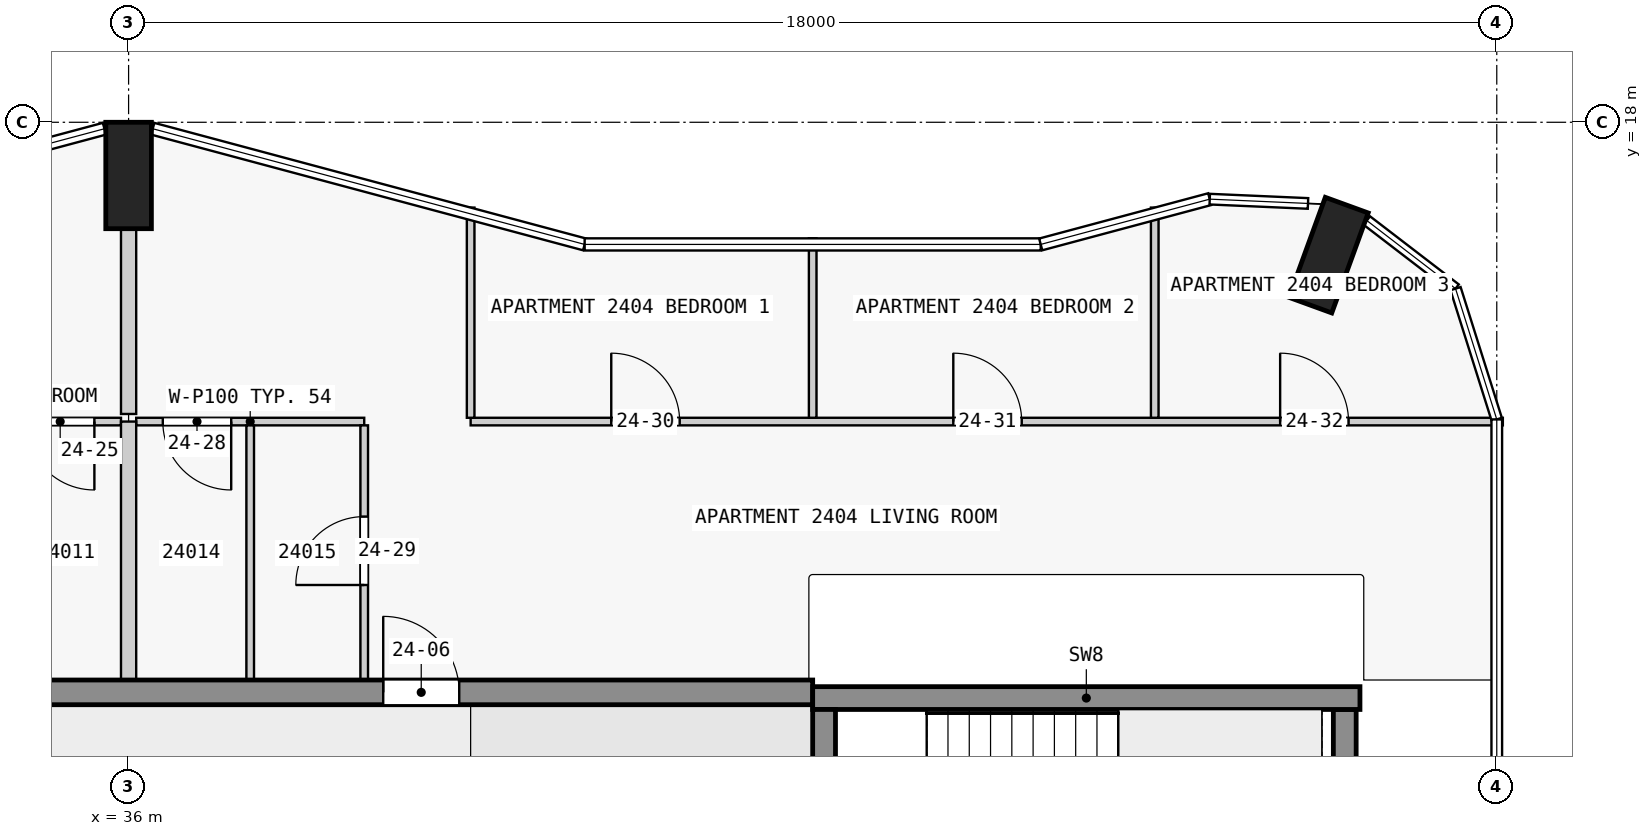
"""IFC4 building model, lengths in metres.
Left out: names, types, materials, properties, quantities, classifications, styles, units other than length and angle.
Written with IfcOpenShell. Run it as: python <this file> out.ifc"""

import sys

from ifc_helpers import new_model, si_unit, direction, frame, frame_2d, origin, origin_2d, place, context, subcontext, project, spatial, rectangle, extrude, element, fill, save


model = new_model("IFC4")
c1 = context("Model", 3, precision=1e-05, world=origin(), true_north=direction((0.0, 1.0)))
c2 = subcontext(c1, "Body", "Model", "MODEL_VIEW")
j1 = project(units=[si_unit("LENGTHUNIT", "METRE"), si_unit("PLANEANGLEUNIT", "RADIAN")], contexts=[c1])
p1 = place(None, origin())
s1 = spatial("IfcSite", under=j1, at=p1, CompositionType="ELEMENT")
p2 = place(p1, origin())
s2 = spatial("IfcBuilding", under=s1, at=p2, CompositionType="ELEMENT")
p3 = place(p2, frame((0.0, 0.0, 95.8)))
s3 = spatial("IfcBuildingStorey", under=s2, at=p3, CompositionType="ELEMENT", Elevation=95.8)
for number, where, z_axis, x_axis in (
    (1, (51.787, 16.252, 0.0), (0.0, 0.0, 1.0), (-0.94, 0.342, 0.0)),
    (2, (36.0, 17.3, 0.0), (0.0, 0.0, 1.0), (1.0, 0.0, 0.0)),
):
    element("IfcColumn", number, at=place(p3, frame(where, z_axis=z_axis, x_axis=x_axis)), inside=s3, PredefinedType="COLUMN", context=c2, shape_type="SweptSolid", body=[
        extrude(rectangle(XDim=0.6, YDim=1.4, at=origin_2d()), origin(), (0.0, 0.0, 1.0), 3.5),
    ])
p4 = place(p3, frame((45.15, 7.725, 0.0), z_axis=(0.0, 0.0, 1.0), x_axis=(0.0, 1.0, 0.0)))
e3 = element("IfcWall", 3, at=p4, inside=s3, PredefinedType="SHEAR", context=c2, shape_type="SweptSolid", body=[
    extrude(rectangle(XDim=2.55, YDim=0.3, at=frame_2d((1.275, 0.0))), origin(), (0.0, 0.0, 1.0), 3.5),
])
p5 = place(p4, frame((0.725, 0.0, 0.0)))
e4 = element("IfcOpeningElement", 4, at=p5, cuts=e3, PredefinedType="OPENING", context=c2, shape_type="SweptSolid", body=[
    extrude(rectangle(XDim=1.1, YDim=2.1, at=frame_2d((0.55, 1.05))), frame((0.0, 0.16, 0.0), z_axis=(0.0, -1.0, 0.0), x_axis=(1.0, 0.0, 0.0)), (0.0, 0.0, 1.0), 0.32),
])
p6 = place(p3, frame((52.0, 7.725, 0.0), z_axis=(0.0, 0.0, 1.0), x_axis=(0.0, 1.0, 0.0)))
e5 = element("IfcWall", 5, at=p6, inside=s3, PredefinedType="SHEAR", context=c2, shape_type="SweptSolid", body=[
    extrude(rectangle(XDim=2.55, YDim=0.3, at=frame_2d((1.275, 0.0))), origin(), (0.0, 0.0, 1.0), 3.5),
])
p7 = place(p3, frame((45.0, 10.425, 0.0), z_axis=(0.0, 0.0, 1.0), x_axis=(1.0, 0.0, 0.0)))
e6 = element("IfcWall", 6, at=p7, inside=s3, PredefinedType="SHEAR", context=c2, shape_type="SweptSolid", body=[
    extrude(rectangle(XDim=7.2, YDim=0.3, at=frame_2d((3.6, 0.0))), origin(), (0.0, 0.0, 1.0), 3.5),
])
p8 = place(p3, frame((22.5, 10.5, 0.0), z_axis=(0.0, 0.0, 1.0), x_axis=(1.0, 0.0, 0.0)))
e7 = element("IfcWall", 7, at=p8, inside=s3, PredefinedType="SHEAR", context=c2, shape_type="SweptSolid", body=[
    extrude(rectangle(XDim=22.5, YDim=0.325, at=frame_2d((11.25, 0.0))), origin(), (0.0, 0.0, 1.0), 3.25),
])
p9 = place(p8, frame((4.75, 0.0, 0.0)))
e8 = element("IfcOpeningElement", 8, at=p9, cuts=e7, PredefinedType="OPENING", context=c2, shape_type="SweptSolid", body=[
    extrude(rectangle(XDim=1.0, YDim=2.1, at=frame_2d((0.5, 1.05))), frame((0.0, 0.172, 0.0), z_axis=(0.0, -1.0, 0.0), x_axis=(1.0, 0.0, 0.0)), (0.0, 0.0, 1.0), 0.345),
])
p10 = place(p8, frame((16.85, 0.0, 0.0)))
e9 = element("IfcOpeningElement", 9, at=p10, cuts=e7, PredefinedType="OPENING", context=c2, shape_type="SweptSolid", body=[
    extrude(rectangle(XDim=1.0, YDim=2.1, at=frame_2d((0.5, 1.05))), frame((0.0, 0.172, 0.0), z_axis=(0.0, -1.0, 0.0), x_axis=(1.0, 0.0, 0.0)), (0.0, 0.0, 1.0), 0.345),
])
p11 = place(p3, frame((35.9, 14.062, 0.0), z_axis=(0.0, 0.0, 1.0), x_axis=(-1.0, 0.0, 0.0)))
e10 = element("IfcWall", 10, at=p11, inside=s3, PredefinedType="PARTITIONING", context=c2, shape_type="SweptSolid", body=[
    extrude(rectangle(XDim=3.0, YDim=0.1, at=frame_2d((1.5, 0.0))), origin(), (0.0, 0.0, 1.0), 3.25),
])
p12 = place(p11, frame((0.35, 0.0, 0.0)))
e11 = element("IfcOpeningElement", 11, at=p12, cuts=e10, PredefinedType="OPENING", context=c2, shape_type="SweptSolid", body=[
    extrude(rectangle(XDim=0.9, YDim=2.1, at=frame_2d((0.45, 1.05))), frame((0.0, 0.06, 0.0), z_axis=(0.0, -1.0, 0.0), x_axis=(1.0, 0.0, 0.0)), (0.0, 0.0, 1.0), 0.12),
])
p13 = place(p3, frame((39.1, 14.062, 0.0), z_axis=(0.0, 0.0, 1.0), x_axis=(-1.0, 0.0, 0.0)))
e12 = element("IfcWall", 12, at=p13, inside=s3, PredefinedType="PARTITIONING", context=c2, shape_type="SweptSolid", body=[
    extrude(rectangle(XDim=3.0, YDim=0.1, at=frame_2d((1.5, 0.0))), origin(), (0.0, 0.0, 1.0), 3.25),
])
p14 = place(p13, frame((1.75, 0.0, 0.0)))
e13 = element("IfcOpeningElement", 13, at=p14, cuts=e12, PredefinedType="OPENING", context=c2, shape_type="SweptSolid", body=[
    extrude(rectangle(XDim=0.9, YDim=2.1, at=frame_2d((0.45, 1.05))), frame((0.0, 0.06, 0.0), z_axis=(0.0, -1.0, 0.0), x_axis=(1.0, 0.0, 0.0)), (0.0, 0.0, 1.0), 0.12),
])
p15 = place(p3, frame((40.5, 14.062, 0.0), z_axis=(0.0, 0.0, 1.0), x_axis=(1.0, 0.0, 0.0)))
e14 = element("IfcWall", 14, at=p15, inside=s3, PredefinedType="PARTITIONING", context=c2, shape_type="SweptSolid", body=[
    extrude(rectangle(XDim=13.58, YDim=0.1, at=frame_2d((6.79, 0.0))), origin(), (0.0, 0.0, 1.0), 3.25),
])
p16 = place(p15, frame((1.85, 0.0, 0.0)))
e15 = element("IfcOpeningElement", 15, at=p16, cuts=e14, PredefinedType="OPENING", context=c2, shape_type="SweptSolid", body=[
    extrude(rectangle(XDim=0.9, YDim=2.1, at=frame_2d((0.45, 1.05))), frame((0.0, 0.06, 0.0), z_axis=(0.0, -1.0, 0.0), x_axis=(1.0, 0.0, 0.0)), (0.0, 0.0, 1.0), 0.12),
])
p17 = place(p15, frame((6.35, 0.0, 0.0)))
e16 = element("IfcOpeningElement", 16, at=p17, cuts=e14, PredefinedType="OPENING", context=c2, shape_type="SweptSolid", body=[
    extrude(rectangle(XDim=0.9, YDim=2.1, at=frame_2d((0.45, 1.05))), frame((0.0, 0.06, 0.0), z_axis=(0.0, -1.0, 0.0), x_axis=(1.0, 0.0, 0.0)), (0.0, 0.0, 1.0), 0.12),
])
p18 = place(p15, frame((10.65, 0.0, 0.0)))
e17 = element("IfcOpeningElement", 17, at=p18, cuts=e14, PredefinedType="OPENING", context=c2, shape_type="SweptSolid", body=[
    extrude(rectangle(XDim=0.9, YDim=2.1, at=frame_2d((0.45, 1.05))), frame((0.0, 0.06, 0.0), z_axis=(0.0, -1.0, 0.0), x_axis=(1.0, 0.0, 0.0)), (0.0, 0.0, 1.0), 0.12),
])
p19 = place(p3, frame((36.0, 16.6, 0.0), z_axis=(0.0, 0.0, 1.0), x_axis=(0.0, -1.0, 0.0)))
e18 = element("IfcWall", 18, at=p19, inside=s3, PredefinedType="PARTITIONING", context=c2, shape_type="SweptSolid", body=[
    extrude(rectangle(XDim=2.438, YDim=0.2, at=frame_2d((1.219, 0.0))), origin(), (0.0, 0.0, 1.0), 3.25),
])
p20 = place(p3, frame((36.0, 10.663, 0.0), z_axis=(0.0, 0.0, 1.0), x_axis=(0.0, 1.0, 0.0)))
e19 = element("IfcWall", 19, at=p20, inside=s3, PredefinedType="PARTITIONING", context=c2, shape_type="SweptSolid", body=[
    extrude(rectangle(XDim=3.4, YDim=0.2, at=frame_2d((1.7, 0.0))), origin(), (0.0, 0.0, 1.0), 3.25),
])
p21 = place(p3, frame((37.6, 10.663, 0.0), z_axis=(0.0, 0.0, 1.0), x_axis=(0.0, 1.0, 0.0)))
e20 = element("IfcWall", 20, at=p21, inside=s3, PredefinedType="PARTITIONING", context=c2, shape_type="SweptSolid", body=[
    extrude(rectangle(XDim=3.35, YDim=0.1, at=frame_2d((1.675, 0.0))), origin(), (0.0, 0.0, 1.0), 3.25),
])
p22 = place(p3, frame((39.1, 10.663, 0.0), z_axis=(0.0, 0.0, 1.0), x_axis=(0.0, 1.0, 0.0)))
e21 = element("IfcWall", 21, at=p22, inside=s3, PredefinedType="PARTITIONING", context=c2, shape_type="SweptSolid", body=[
    extrude(rectangle(XDim=3.35, YDim=0.1, at=frame_2d((1.675, 0.0))), origin(), (0.0, 0.0, 1.0), 3.25),
])
p23 = place(p22, frame((1.25, 0.0, 0.0)))
e22 = element("IfcOpeningElement", 22, at=p23, cuts=e21, PredefinedType="OPENING", context=c2, shape_type="SweptSolid", body=[
    extrude(rectangle(XDim=0.9, YDim=2.1, at=frame_2d((0.45, 1.05))), frame((0.0, 0.06, 0.0), z_axis=(0.0, -1.0, 0.0), x_axis=(1.0, 0.0, 0.0)), (0.0, 0.0, 1.0), 0.12),
])
p24 = place(p3, frame((40.5, 16.878, 0.0), z_axis=(0.0, 0.0, 1.0), x_axis=(0.0, -1.0, 0.0)))
e23 = element("IfcWall", 23, at=p24, inside=s3, PredefinedType="PARTITIONING", context=c2, shape_type="SweptSolid", body=[
    extrude(rectangle(XDim=2.765, YDim=0.1, at=frame_2d((1.383, 0.0))), origin(), (0.0, 0.0, 1.0), 3.25),
])
p25 = place(p3, frame((45.0, 14.113, 0.0), z_axis=(0.0, 0.0, 1.0), x_axis=(0.0, 1.0, 0.0)))
e24 = element("IfcWall", 24, at=p25, inside=s3, PredefinedType="PARTITIONING", context=c2, shape_type="SweptSolid", body=[
    extrude(rectangle(XDim=2.361, YDim=0.1, at=frame_2d((1.18, 0.0))), origin(), (0.0, 0.0, 1.0), 3.25),
])
p26 = place(p3, frame((49.5, 14.113, 0.0), z_axis=(0.0, 0.0, 1.0), x_axis=(0.0, 1.0, 0.0)))
e25 = element("IfcWall", 25, at=p26, inside=s3, PredefinedType="PARTITIONING", context=c2, shape_type="SweptSolid", body=[
    extrude(rectangle(XDim=2.765, YDim=0.1, at=frame_2d((1.383, 0.0))), origin(), (0.0, 0.0, 1.0), 3.25),
])
p27 = place(p10, origin())
e26 = element("IfcDoor", 26, at=p27, inside=s3, OperationType="SINGLE_SWING_RIGHT", PredefinedType="DOOR", context=c2, shape_type="SweptSolid", body=[
    extrude(rectangle(XDim=1.0, YDim=2.1, at=frame_2d((0.5, 1.05))), frame((0.0, 0.025, 0.0), z_axis=(0.0, -1.0, 0.0), x_axis=(1.0, 0.0, 0.0)), (0.0, 0.0, 1.0), 0.05),
])
fill(e9, e26)
p28 = place(p12, origin())
e27 = element("IfcDoor", 27, at=p28, inside=s3, OperationType="SINGLE_SWING_LEFT", PredefinedType="DOOR", context=c2, shape_type="SweptSolid", body=[
    extrude(rectangle(XDim=0.9, YDim=2.1, at=frame_2d((0.45, 1.05))), frame((0.0, 0.025, 0.0), z_axis=(0.0, -1.0, 0.0), x_axis=(1.0, 0.0, 0.0)), (0.0, 0.0, 1.0), 0.05),
])
fill(e11, e27)
p29 = place(p14, origin())
e28 = element("IfcDoor", 28, at=p29, inside=s3, OperationType="SINGLE_SWING_RIGHT", PredefinedType="DOOR", context=c2, shape_type="SweptSolid", body=[
    extrude(rectangle(XDim=0.9, YDim=2.1, at=frame_2d((0.45, 1.05))), frame((0.0, 0.025, 0.0), z_axis=(0.0, -1.0, 0.0), x_axis=(1.0, 0.0, 0.0)), (0.0, 0.0, 1.0), 0.05),
])
fill(e13, e28)
p30 = place(p23, origin())
e29 = element("IfcDoor", 29, at=p30, inside=s3, OperationType="SINGLE_SWING_RIGHT", PredefinedType="DOOR", context=c2, shape_type="SweptSolid", body=[
    extrude(rectangle(XDim=0.9, YDim=2.1, at=frame_2d((0.45, 1.05))), frame((0.0, 0.025, 0.0), z_axis=(0.0, -1.0, 0.0), x_axis=(1.0, 0.0, 0.0)), (0.0, 0.0, 1.0), 0.05),
])
fill(e22, e29)
p31 = place(p16, origin())
e30 = element("IfcDoor", 30, at=p31, inside=s3, OperationType="SINGLE_SWING_LEFT", PredefinedType="DOOR", context=c2, shape_type="SweptSolid", body=[
    extrude(rectangle(XDim=0.9, YDim=2.1, at=frame_2d((0.45, 1.05))), frame((0.0, 0.025, 0.0), z_axis=(0.0, -1.0, 0.0), x_axis=(1.0, 0.0, 0.0)), (0.0, 0.0, 1.0), 0.05),
])
fill(e15, e30)
p32 = place(p17, origin())
e31 = element("IfcDoor", 31, at=p32, inside=s3, OperationType="SINGLE_SWING_RIGHT", PredefinedType="DOOR", context=c2, shape_type="SweptSolid", body=[
    extrude(rectangle(XDim=0.9, YDim=2.1, at=frame_2d((0.45, 1.05))), frame((0.0, 0.025, 0.0), z_axis=(0.0, -1.0, 0.0), x_axis=(1.0, 0.0, 0.0)), (0.0, 0.0, 1.0), 0.05),
])
fill(e16, e31)
p33 = place(p18, origin())
e32 = element("IfcDoor", 32, at=p33, inside=s3, OperationType="SINGLE_SWING_RIGHT", PredefinedType="DOOR", context=c2, shape_type="SweptSolid", body=[
    extrude(rectangle(XDim=0.9, YDim=2.1, at=frame_2d((0.45, 1.05))), frame((0.0, 0.025, 0.0), z_axis=(0.0, -1.0, 0.0), x_axis=(1.0, 0.0, 0.0)), (0.0, 0.0, 1.0), 0.05),
])
fill(e17, e32)
save(model, sys.argv[1])
